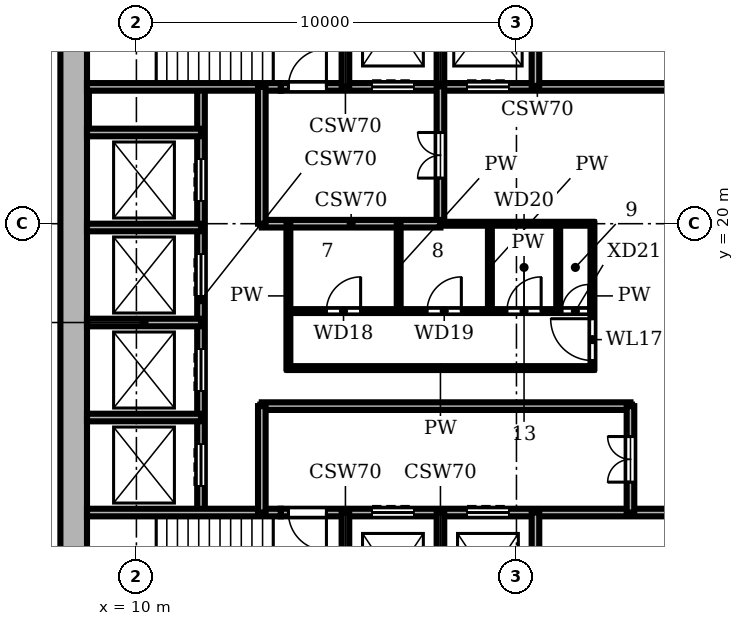
"""IFC4 building model, lengths in metres.
Left out: names, types, materials, properties, quantities, classifications, styles, units other than length and angle.
Written with IfcOpenShell. Run it as: python <this file> out.ifc"""

import sys

from ifc_helpers import new_model, si_unit, direction, frame, frame_2d, origin, place, context, subcontext, project, spatial, rectangle, extrude, element, fill, save


model = new_model("IFC4")
c1 = context("Model", 3, precision=1e-05, world=origin(), true_north=direction((0.0, 1.0)))
c2 = subcontext(c1, "Body", "Model", "MODEL_VIEW")
j1 = project(units=[si_unit("LENGTHUNIT", "METRE"), si_unit("PLANEANGLEUNIT", "RADIAN")], contexts=[c1])
p1 = place(None, origin())
s1 = spatial("IfcSite", under=j1, at=p1, CompositionType="ELEMENT")
p2 = place(p1, origin())
s2 = spatial("IfcBuilding", under=s1, at=p2, CompositionType="ELEMENT")
p3 = place(p2, frame((0.0, 0.0, 201.9)))
s3 = spatial("IfcBuildingStorey", under=s2, at=p3, CompositionType="ELEMENT", Elevation=201.9)
p4 = place(p3, frame((8.35, 27.3, 0.0), z_axis=(0.0, 0.0, 1.0), x_axis=(0.0, -1.0, 0.0)))
e1 = element("IfcWall", 1, at=p4, inside=s3, PredefinedType="SHEAR", context=c2, shape_type="SweptSolid", body=[
    extrude(rectangle(XDim=18.6, YDim=0.7, at=frame_2d((9.3, 0.0))), origin(), (0.0, 0.0, 1.0), 3.9),
])
p5 = place(p3, frame((8.7, 12.4, 0.0), z_axis=(0.0, 0.0, 1.0), x_axis=(1.0, 0.0, 0.0)))
e2 = element("IfcWall", 2, at=p5, inside=s3, PredefinedType="SHEAR", context=c2, shape_type="SweptSolid", body=[
    extrude(rectangle(XDim=5.1, YDim=0.2, at=frame_2d((2.55, 0.0))), origin(), (0.0, 0.0, 1.0), 3.58),
])
p6 = place(p3, frame((13.8, 12.4, 0.0), z_axis=(0.0, 0.0, 1.0), x_axis=(1.0, 0.0, 0.0)))
e3 = element("IfcWall", 3, at=p6, inside=s3, PredefinedType="SHEAR", context=c2, shape_type="SweptSolid", body=[
    extrude(rectangle(XDim=13.5, YDim=0.2, at=frame_2d((6.75, 0.0))), origin(), (0.0, 0.0, 1.0), 3.58),
])
p7 = place(p6, frame((2.4, 0.0, 0.0)))
e4 = element("IfcOpeningElement", 4, at=p7, cuts=e3, PredefinedType="OPENING", context=c2, shape_type="SweptSolid", body=[
    extrude(rectangle(XDim=1.1, YDim=2.1, at=frame_2d((0.55, 1.05))), frame((0.0, 0.11, 0.0), z_axis=(0.0, -1.0, 0.0), x_axis=(1.0, 0.0, 0.0)), (0.0, 0.0, 1.0), 0.22),
])
p8 = place(p6, frame((4.9, 0.0, 0.0)))
e5 = element("IfcOpeningElement", 5, at=p8, cuts=e3, PredefinedType="OPENING", context=c2, shape_type="SweptSolid", body=[
    extrude(rectangle(XDim=1.1, YDim=2.1, at=frame_2d((0.55, 1.05))), frame((0.0, 0.11, 0.0), z_axis=(0.0, -1.0, 0.0), x_axis=(1.0, 0.0, 0.0)), (0.0, 0.0, 1.0), 0.22),
])
p9 = place(p6, frame((0.2, 0.0, 0.0)))
e6 = element("IfcOpeningElement", 6, at=p9, cuts=e3, PredefinedType="OPENING", context=c2, shape_type="SweptSolid", body=[
    extrude(rectangle(XDim=1.0, YDim=2.1, at=frame_2d((0.5, 1.05))), frame((0.0, 0.11, 0.0), z_axis=(0.0, -1.0, 0.0), x_axis=(1.0, 0.0, 0.0)), (0.0, 0.0, 1.0), 0.22),
])
p10 = place(p3, frame((8.7, 14.9, 0.0), z_axis=(0.0, 0.0, 1.0), x_axis=(1.0, 0.0, 0.0)))
e7 = element("IfcWall", 7, at=p10, inside=s3, PredefinedType="SHEAR", context=c2, shape_type="SweptSolid", body=[
    extrude(rectangle(XDim=3.0, YDim=0.2, at=frame_2d((1.5, 0.0))), origin(), (0.0, 0.0, 1.0), 3.58),
])
p11 = place(p3, frame((13.3, 15.2, 0.0), z_axis=(0.0, 0.0, 1.0), x_axis=(1.0, 0.0, 0.0)))
e8 = element("IfcWall", 8, at=p11, inside=s3, PredefinedType="SHEAR", context=c2, shape_type="SweptSolid", body=[
    extrude(rectangle(XDim=9.7, YDim=0.2, at=frame_2d((4.85, 0.0))), origin(), (0.0, 0.0, 1.0), 3.58),
])
p12 = place(p3, frame((14.0, 16.2, 0.0), z_axis=(0.0, 0.0, 1.0), x_axis=(1.0, 0.0, 0.0)))
e9 = element("IfcWall", 9, at=p12, inside=s3, PredefinedType="PARTITIONING", context=c2, shape_type="SweptSolid", body=[
    extrude(rectangle(XDim=8.0, YDim=0.1, at=frame_2d((4.0, 0.0))), origin(), (0.0, 0.0, 1.0), 3.58),
])
p13 = place(p3, frame((8.7, 17.4, 0.0), z_axis=(0.0, 0.0, 1.0), x_axis=(1.0, 0.0, 0.0)))
e10 = element("IfcWall", 10, at=p13, inside=s3, PredefinedType="SHEAR", context=c2, shape_type="SweptSolid", body=[
    extrude(rectangle(XDim=3.0, YDim=0.2, at=frame_2d((1.5, 0.0))), origin(), (0.0, 0.0, 1.0), 3.58),
])
p14 = place(p3, frame((14.0, 17.7, 0.0), z_axis=(0.0, 0.0, 1.0), x_axis=(1.0, 0.0, 0.0)))
e11 = element("IfcWall", 11, at=p14, inside=s3, PredefinedType="PARTITIONING", context=c2, shape_type="SweptSolid", body=[
    extrude(rectangle(XDim=8.0, YDim=0.1, at=frame_2d((4.0, 0.0))), origin(), (0.0, 0.0, 1.0), 3.58),
])
p15 = place(p14, frame((1.0, 0.0, 0.0)))
e12 = element("IfcOpeningElement", 12, at=p15, cuts=e11, PredefinedType="OPENING", context=c2, shape_type="SweptSolid", body=[
    extrude(rectangle(XDim=0.9, YDim=2.1, at=frame_2d((0.45, 1.05))), frame((0.0, 0.06, 0.0), z_axis=(0.0, -1.0, 0.0), x_axis=(1.0, 0.0, 0.0)), (0.0, 0.0, 1.0), 0.12),
])
p16 = place(p14, frame((3.65, 0.0, 0.0)))
e13 = element("IfcOpeningElement", 13, at=p16, cuts=e11, PredefinedType="OPENING", context=c2, shape_type="SweptSolid", body=[
    extrude(rectangle(XDim=0.9, YDim=2.1, at=frame_2d((0.45, 1.05))), frame((0.0, 0.06, 0.0), z_axis=(0.0, -1.0, 0.0), x_axis=(1.0, 0.0, 0.0)), (0.0, 0.0, 1.0), 0.12),
])
p17 = place(p14, frame((5.75, 0.0, 0.0)))
e14 = element("IfcOpeningElement", 14, at=p17, cuts=e11, PredefinedType="OPENING", context=c2, shape_type="SweptSolid", body=[
    extrude(rectangle(XDim=0.9, YDim=2.1, at=frame_2d((0.45, 1.05))), frame((0.0, 0.06, 0.0), z_axis=(0.0, -1.0, 0.0), x_axis=(1.0, 0.0, 0.0)), (0.0, 0.0, 1.0), 0.12),
])
p18 = place(p14, frame((7.2, 0.0, 0.0)))
e15 = element("IfcOpeningElement", 15, at=p18, cuts=e11, PredefinedType="OPENING", context=c2, shape_type="SweptSolid", body=[
    extrude(rectangle(XDim=0.7, YDim=2.1, at=frame_2d((0.35, 1.05))), frame((0.0, 0.06, 0.0), z_axis=(0.0, -1.0, 0.0), x_axis=(1.0, 0.0, 0.0)), (0.0, 0.0, 1.0), 0.12),
])
p19 = place(p3, frame((8.7, 19.9, 0.0), z_axis=(0.0, 0.0, 1.0), x_axis=(1.0, 0.0, 0.0)))
e16 = element("IfcWall", 16, at=p19, inside=s3, PredefinedType="SHEAR", context=c2, shape_type="SweptSolid", body=[
    extrude(rectangle(XDim=3.0, YDim=0.2, at=frame_2d((1.5, 0.0))), origin(), (0.0, 0.0, 1.0), 3.58),
])
p20 = place(p3, frame((18.0, 20.0, 0.0), z_axis=(0.0, 0.0, 1.0), x_axis=(1.0, 0.0, 0.0)))
e17 = element("IfcWall", 17, at=p20, inside=s3, PredefinedType="PARTITIONING", context=c2, shape_type="SweptSolid", body=[
    extrude(rectangle(XDim=4.0, YDim=0.1, at=frame_2d((2.0, 0.0))), origin(), (0.0, 0.0, 1.0), 3.58),
])
p21 = place(p3, frame((13.3, 20.0, 0.0), z_axis=(0.0, 0.0, 1.0), x_axis=(1.0, 0.0, 0.0)))
e18 = element("IfcWall", 18, at=p21, inside=s3, PredefinedType="SHEAR", context=c2, shape_type="SweptSolid", body=[
    extrude(rectangle(XDim=4.7, YDim=0.2, at=frame_2d((2.35, 0.0))), origin(), (0.0, 0.0, 1.0), 3.58),
])
p22 = place(p3, frame((8.7, 22.4, 0.0), z_axis=(0.0, 0.0, 1.0), x_axis=(1.0, 0.0, 0.0)))
e19 = element("IfcWall", 19, at=p22, inside=s3, PredefinedType="SHEAR", context=c2, shape_type="SweptSolid", body=[
    extrude(rectangle(XDim=3.0, YDim=0.2, at=frame_2d((1.5, 0.0))), origin(), (0.0, 0.0, 1.0), 3.58),
])
p23 = place(p3, frame((8.7, 23.6, 0.0), z_axis=(0.0, 0.0, 1.0), x_axis=(1.0, 0.0, 0.0)))
e20 = element("IfcWall", 20, at=p23, inside=s3, PredefinedType="SHEAR", context=c2, shape_type="SweptSolid", body=[
    extrude(rectangle(XDim=5.1, YDim=0.2, at=frame_2d((2.55, 0.0))), origin(), (0.0, 0.0, 1.0), 3.58),
])
p24 = place(p3, frame((13.8, 23.6, 0.0), z_axis=(0.0, 0.0, 1.0), x_axis=(1.0, 0.0, 0.0)))
e21 = element("IfcWall", 21, at=p24, inside=s3, PredefinedType="SHEAR", context=c2, shape_type="SweptSolid", body=[
    extrude(rectangle(XDim=13.5, YDim=0.2, at=frame_2d((6.75, 0.0))), origin(), (0.0, 0.0, 1.0), 3.58),
])
p25 = place(p24, frame((2.4, 0.0, 0.0)))
e22 = element("IfcOpeningElement", 22, at=p25, cuts=e21, PredefinedType="OPENING", context=c2, shape_type="SweptSolid", body=[
    extrude(rectangle(XDim=1.1, YDim=2.1, at=frame_2d((0.55, 1.05))), frame((0.0, 0.11, 0.0), z_axis=(0.0, -1.0, 0.0), x_axis=(1.0, 0.0, 0.0)), (0.0, 0.0, 1.0), 0.22),
])
p26 = place(p24, frame((4.9, 0.0, 0.0)))
e23 = element("IfcOpeningElement", 23, at=p26, cuts=e21, PredefinedType="OPENING", context=c2, shape_type="SweptSolid", body=[
    extrude(rectangle(XDim=1.1, YDim=2.1, at=frame_2d((0.55, 1.05))), frame((0.0, 0.11, 0.0), z_axis=(0.0, -1.0, 0.0), x_axis=(1.0, 0.0, 0.0)), (0.0, 0.0, 1.0), 0.22),
])
p27 = place(p24, frame((0.2, 0.0, 0.0)))
e24 = element("IfcOpeningElement", 24, at=p27, cuts=e21, PredefinedType="OPENING", context=c2, shape_type="SweptSolid", body=[
    extrude(rectangle(XDim=1.0, YDim=2.1, at=frame_2d((0.5, 1.05))), frame((0.0, 0.11, 0.0), z_axis=(0.0, -1.0, 0.0), x_axis=(1.0, 0.0, 0.0)), (0.0, 0.0, 1.0), 0.22),
])
p28 = place(p3, frame((11.7, 12.4, 0.0), z_axis=(0.0, 0.0, 1.0), x_axis=(0.0, 1.0, 0.0)))
e25 = element("IfcWall", 25, at=p28, inside=s3, PredefinedType="SHEAR", context=c2, shape_type="SweptSolid", body=[
    extrude(rectangle(XDim=11.2, YDim=0.2, at=frame_2d((5.6, 0.0))), origin(), (0.0, 0.0, 1.0), 3.58),
])
p29 = place(p28, frame((0.7, 0.0, 0.0)))
e26 = element("IfcOpeningElement", 26, at=p29, cuts=e25, PredefinedType="OPENING", context=c2, shape_type="SweptSolid", body=[
    extrude(rectangle(XDim=1.1, YDim=2.1, at=frame_2d((0.55, 1.05))), frame((0.0, 0.11, 0.0), z_axis=(0.0, -1.0, 0.0), x_axis=(1.0, 0.0, 0.0)), (0.0, 0.0, 1.0), 0.22),
])
p30 = place(p28, frame((3.2, 0.0, 0.0)))
e27 = element("IfcOpeningElement", 27, at=p30, cuts=e25, PredefinedType="OPENING", context=c2, shape_type="SweptSolid", body=[
    extrude(rectangle(XDim=1.1, YDim=2.1, at=frame_2d((0.55, 1.05))), frame((0.0, 0.11, 0.0), z_axis=(0.0, -1.0, 0.0), x_axis=(1.0, 0.0, 0.0)), (0.0, 0.0, 1.0), 0.22),
])
p31 = place(p28, frame((5.7, 0.0, 0.0)))
e28 = element("IfcOpeningElement", 28, at=p31, cuts=e25, PredefinedType="OPENING", context=c2, shape_type="SweptSolid", body=[
    extrude(rectangle(XDim=1.1, YDim=2.1, at=frame_2d((0.55, 1.05))), frame((0.0, 0.11, 0.0), z_axis=(0.0, -1.0, 0.0), x_axis=(1.0, 0.0, 0.0)), (0.0, 0.0, 1.0), 0.22),
])
p32 = place(p28, frame((8.2, 0.0, 0.0)))
e29 = element("IfcOpeningElement", 29, at=p32, cuts=e25, PredefinedType="OPENING", context=c2, shape_type="SweptSolid", body=[
    extrude(rectangle(XDim=1.1, YDim=2.1, at=frame_2d((0.55, 1.05))), frame((0.0, 0.11, 0.0), z_axis=(0.0, -1.0, 0.0), x_axis=(1.0, 0.0, 0.0)), (0.0, 0.0, 1.0), 0.22),
])
p33 = place(p3, frame((13.3, 12.4, 0.0), z_axis=(0.0, 0.0, 1.0), x_axis=(0.0, 1.0, 0.0)))
e30 = element("IfcWall", 30, at=p33, inside=s3, PredefinedType="SHEAR", context=c2, shape_type="SweptSolid", body=[
    extrude(rectangle(XDim=2.8, YDim=0.2, at=frame_2d((1.4, 0.0))), origin(), (0.0, 0.0, 1.0), 3.58),
])
p34 = place(p3, frame((13.3, 20.0, 0.0), z_axis=(0.0, 0.0, 1.0), x_axis=(0.0, 1.0, 0.0)))
e31 = element("IfcWall", 31, at=p34, inside=s3, PredefinedType="SHEAR", context=c2, shape_type="SweptSolid", body=[
    extrude(rectangle(XDim=3.6, YDim=0.2, at=frame_2d((1.8, 0.0))), origin(), (0.0, 0.0, 1.0), 3.58),
])
p35 = place(p3, frame((14.0, 16.2, 0.0), z_axis=(0.0, 0.0, 1.0), x_axis=(0.0, 1.0, 0.0)))
e32 = element("IfcWall", 32, at=p35, inside=s3, PredefinedType="PARTITIONING", context=c2, shape_type="SweptSolid", body=[
    extrude(rectangle(XDim=3.8, YDim=0.1, at=frame_2d((1.9, 0.0))), origin(), (0.0, 0.0, 1.0), 3.58),
])
for number, where, z_axis, x_axis in (
    (33, (15.5, 8.7, 0.0), (0.0, 0.0, 1.0), (0.0, 1.0, 0.0)),
    (34, (15.5, 23.6, 0.0), (0.0, 0.0, 1.0), (0.0, 1.0, 0.0)),
):
    element("IfcWall", number, at=place(p3, frame(where, z_axis=z_axis, x_axis=x_axis)), inside=s3, PredefinedType="SHEAR", context=c2, shape_type="SweptSolid", body=[
        extrude(rectangle(XDim=3.7, YDim=0.2, at=frame_2d((1.85, 0.0))), origin(), (0.0, 0.0, 1.0), 3.58),
    ])
p36 = place(p3, frame((16.9, 17.7, 0.0), z_axis=(0.0, 0.0, 1.0), x_axis=(0.0, 1.0, 0.0)))
e35 = element("IfcWall", 35, at=p36, inside=s3, PredefinedType="PARTITIONING", context=c2, shape_type="SweptSolid", body=[
    extrude(rectangle(XDim=2.3, YDim=0.1, at=frame_2d((1.15, 0.0))), origin(), (0.0, 0.0, 1.0), 3.58),
])
p37 = place(p3, frame((18.0, 8.7, 0.0), z_axis=(0.0, 0.0, 1.0), x_axis=(0.0, 1.0, 0.0)))
e36 = element("IfcWall", 36, at=p37, inside=s3, PredefinedType="SHEAR", context=c2, shape_type="SweptSolid", body=[
    extrude(rectangle(XDim=3.7, YDim=0.2, at=frame_2d((1.85, 0.0))), origin(), (0.0, 0.0, 1.0), 3.58),
])
p38 = place(p3, frame((18.0, 20.0, 0.0), z_axis=(0.0, 0.0, 1.0), x_axis=(0.0, 1.0, 0.0)))
e37 = element("IfcWall", 37, at=p38, inside=s3, PredefinedType="SHEAR", context=c2, shape_type="SweptSolid", body=[
    extrude(rectangle(XDim=7.3, YDim=0.2, at=frame_2d((3.65, 0.0))), origin(), (0.0, 0.0, 1.0), 3.58),
])
p39 = place(p38, frame((1.2, 0.0, 0.0)))
e38 = element("IfcOpeningElement", 38, at=p39, cuts=e37, PredefinedType="OPENING", context=c2, shape_type="SweptSolid", body=[
    extrude(rectangle(XDim=1.2, YDim=2.1, at=frame_2d((0.6, 1.05))), frame((0.0, 0.11, 0.0), z_axis=(0.0, -1.0, 0.0), x_axis=(1.0, 0.0, 0.0)), (0.0, 0.0, 1.0), 0.22),
])
p40 = place(p3, frame((19.3, 17.7, 0.0), z_axis=(0.0, 0.0, 1.0), x_axis=(0.0, 1.0, 0.0)))
e39 = element("IfcWall", 39, at=p40, inside=s3, PredefinedType="PARTITIONING", context=c2, shape_type="SweptSolid", body=[
    extrude(rectangle(XDim=2.3, YDim=0.1, at=frame_2d((1.15, 0.0))), origin(), (0.0, 0.0, 1.0), 3.58),
])
for number, where, z_axis, x_axis in (
    (40, (20.5, 8.7, 0.0), (0.0, 0.0, 1.0), (0.0, 1.0, 0.0)),
    (41, (20.5, 23.6, 0.0), (0.0, 0.0, 1.0), (0.0, 1.0, 0.0)),
):
    element("IfcWall", number, at=place(p3, frame(where, z_axis=z_axis, x_axis=x_axis)), inside=s3, PredefinedType="SHEAR", context=c2, shape_type="SweptSolid", body=[
        extrude(rectangle(XDim=3.7, YDim=0.2, at=frame_2d((1.85, 0.0))), origin(), (0.0, 0.0, 1.0), 3.58),
    ])
p41 = place(p3, frame((21.1, 17.7, 0.0), z_axis=(0.0, 0.0, 1.0), x_axis=(0.0, 1.0, 0.0)))
e42 = element("IfcWall", 42, at=p41, inside=s3, PredefinedType="PARTITIONING", context=c2, shape_type="SweptSolid", body=[
    extrude(rectangle(XDim=2.3, YDim=0.1, at=frame_2d((1.15, 0.0))), origin(), (0.0, 0.0, 1.0), 3.58),
])
p42 = place(p3, frame((22.0, 16.2, 0.0), z_axis=(0.0, 0.0, 1.0), x_axis=(0.0, 1.0, 0.0)))
e43 = element("IfcWall", 43, at=p42, inside=s3, PredefinedType="PARTITIONING", context=c2, shape_type="SweptSolid", body=[
    extrude(rectangle(XDim=3.8, YDim=0.1, at=frame_2d((1.9, 0.0))), origin(), (0.0, 0.0, 1.0), 3.58),
])
p43 = place(p42, frame((0.2, 0.0, 0.0)))
e44 = element("IfcOpeningElement", 44, at=p43, cuts=e43, PredefinedType="OPENING", context=c2, shape_type="SweptSolid", body=[
    extrude(rectangle(XDim=1.1, YDim=2.1, at=frame_2d((0.55, 1.05))), frame((0.0, 0.06, 0.0), z_axis=(0.0, -1.0, 0.0), x_axis=(1.0, 0.0, 0.0)), (0.0, 0.0, 1.0), 0.12),
])
p44 = place(p3, frame((23.0, 12.4, 0.0), z_axis=(0.0, 0.0, 1.0), x_axis=(0.0, 1.0, 0.0)))
e45 = element("IfcWall", 45, at=p44, inside=s3, PredefinedType="SHEAR", context=c2, shape_type="SweptSolid", body=[
    extrude(rectangle(XDim=2.8, YDim=0.2, at=frame_2d((1.4, 0.0))), origin(), (0.0, 0.0, 1.0), 3.58),
])
p45 = place(p44, frame((0.8, 0.0, 0.0)))
e46 = element("IfcOpeningElement", 46, at=p45, cuts=e45, PredefinedType="OPENING", context=c2, shape_type="SweptSolid", body=[
    extrude(rectangle(XDim=1.2, YDim=2.1, at=frame_2d((0.6, 1.05))), frame((0.0, 0.11, 0.0), z_axis=(0.0, -1.0, 0.0), x_axis=(1.0, 0.0, 0.0)), (0.0, 0.0, 1.0), 0.22),
])
p46 = place(p29, origin())
e47 = element("IfcDoor", 47, at=p46, inside=s3, OperationType="DOUBLE_DOOR_SLIDING", PredefinedType="DOOR", context=c2, shape_type="SweptSolid", body=[
    extrude(rectangle(XDim=1.1, YDim=2.1, at=frame_2d((0.55, 1.05))), frame((0.0, 0.025, 0.0), z_axis=(0.0, -1.0, 0.0), x_axis=(1.0, 0.0, 0.0)), (0.0, 0.0, 1.0), 0.05),
])
fill(e26, e47)
p47 = place(p30, origin())
e48 = element("IfcDoor", 48, at=p47, inside=s3, OperationType="DOUBLE_DOOR_SLIDING", PredefinedType="DOOR", context=c2, shape_type="SweptSolid", body=[
    extrude(rectangle(XDim=1.1, YDim=2.1, at=frame_2d((0.55, 1.05))), frame((0.0, 0.025, 0.0), z_axis=(0.0, -1.0, 0.0), x_axis=(1.0, 0.0, 0.0)), (0.0, 0.0, 1.0), 0.05),
])
fill(e27, e48)
p48 = place(p31, origin())
e49 = element("IfcDoor", 49, at=p48, inside=s3, OperationType="DOUBLE_DOOR_SLIDING", PredefinedType="DOOR", context=c2, shape_type="SweptSolid", body=[
    extrude(rectangle(XDim=1.1, YDim=2.1, at=frame_2d((0.55, 1.05))), frame((0.0, 0.025, 0.0), z_axis=(0.0, -1.0, 0.0), x_axis=(1.0, 0.0, 0.0)), (0.0, 0.0, 1.0), 0.05),
])
fill(e28, e49)
p49 = place(p32, origin())
e50 = element("IfcDoor", 50, at=p49, inside=s3, OperationType="DOUBLE_DOOR_SLIDING", PredefinedType="DOOR", context=c2, shape_type="SweptSolid", body=[
    extrude(rectangle(XDim=1.1, YDim=2.1, at=frame_2d((0.55, 1.05))), frame((0.0, 0.025, 0.0), z_axis=(0.0, -1.0, 0.0), x_axis=(1.0, 0.0, 0.0)), (0.0, 0.0, 1.0), 0.05),
])
fill(e29, e50)
p50 = place(p7, origin())
e51 = element("IfcDoor", 51, at=p50, inside=s3, OperationType="DOUBLE_DOOR_SLIDING", PredefinedType="DOOR", context=c2, shape_type="SweptSolid", body=[
    extrude(rectangle(XDim=1.1, YDim=2.1, at=frame_2d((0.55, 1.05))), frame((0.0, 0.025, 0.0), z_axis=(0.0, -1.0, 0.0), x_axis=(1.0, 0.0, 0.0)), (0.0, 0.0, 1.0), 0.05),
])
fill(e4, e51)
p51 = place(p8, origin())
e52 = element("IfcDoor", 52, at=p51, inside=s3, OperationType="DOUBLE_DOOR_SLIDING", PredefinedType="DOOR", context=c2, shape_type="SweptSolid", body=[
    extrude(rectangle(XDim=1.1, YDim=2.1, at=frame_2d((0.55, 1.05))), frame((0.0, 0.025, 0.0), z_axis=(0.0, -1.0, 0.0), x_axis=(1.0, 0.0, 0.0)), (0.0, 0.0, 1.0), 0.05),
])
fill(e5, e52)
p52 = place(p25, origin())
e53 = element("IfcDoor", 53, at=p52, inside=s3, OperationType="DOUBLE_DOOR_SLIDING", PredefinedType="DOOR", context=c2, shape_type="SweptSolid", body=[
    extrude(rectangle(XDim=1.1, YDim=2.1, at=frame_2d((0.55, 1.05))), frame((0.0, 0.025, 0.0), z_axis=(0.0, -1.0, 0.0), x_axis=(1.0, 0.0, 0.0)), (0.0, 0.0, 1.0), 0.05),
])
fill(e22, e53)
p53 = place(p26, origin())
e54 = element("IfcDoor", 54, at=p53, inside=s3, OperationType="DOUBLE_DOOR_SLIDING", PredefinedType="DOOR", context=c2, shape_type="SweptSolid", body=[
    extrude(rectangle(XDim=1.1, YDim=2.1, at=frame_2d((0.55, 1.05))), frame((0.0, 0.025, 0.0), z_axis=(0.0, -1.0, 0.0), x_axis=(1.0, 0.0, 0.0)), (0.0, 0.0, 1.0), 0.05),
])
fill(e23, e54)
p54 = place(p9, frame((1.0, 0.0, 0.0), z_axis=(0.0, 0.0, 1.0), x_axis=(-1.0, 0.0, 0.0)))
e55 = element("IfcDoor", 55, at=p54, inside=s3, OperationType="SINGLE_SWING_LEFT", PredefinedType="DOOR", context=c2, shape_type="SweptSolid", body=[
    extrude(rectangle(XDim=1.0, YDim=2.1, at=frame_2d((0.5, 1.05))), frame((0.0, 0.025, 0.0), z_axis=(0.0, -1.0, 0.0), x_axis=(1.0, 0.0, 0.0)), (0.0, 0.0, 1.0), 0.05),
])
fill(e6, e55)
p55 = place(p27, origin())
e56 = element("IfcDoor", 56, at=p55, inside=s3, OperationType="SINGLE_SWING_RIGHT", PredefinedType="DOOR", context=c2, shape_type="SweptSolid", body=[
    extrude(rectangle(XDim=1.0, YDim=2.1, at=frame_2d((0.5, 1.05))), frame((0.0, 0.025, 0.0), z_axis=(0.0, -1.0, 0.0), x_axis=(1.0, 0.0, 0.0)), (0.0, 0.0, 1.0), 0.05),
])
fill(e24, e56)
p56 = place(p45, origin())
e57 = element("IfcDoor", 57, at=p56, inside=s3, OperationType="DOUBLE_DOOR_SINGLE_SWING", PredefinedType="DOOR", context=c2, shape_type="SweptSolid", body=[
    extrude(rectangle(XDim=1.2, YDim=2.1, at=frame_2d((0.6, 1.05))), frame((0.0, 0.025, 0.0), z_axis=(0.0, -1.0, 0.0), x_axis=(1.0, 0.0, 0.0)), (0.0, 0.0, 1.0), 0.05),
])
fill(e46, e57)
p57 = place(p39, origin())
e58 = element("IfcDoor", 58, at=p57, inside=s3, OperationType="DOUBLE_DOOR_SINGLE_SWING", PredefinedType="DOOR", context=c2, shape_type="SweptSolid", body=[
    extrude(rectangle(XDim=1.2, YDim=2.1, at=frame_2d((0.6, 1.05))), frame((0.0, 0.025, 0.0), z_axis=(0.0, -1.0, 0.0), x_axis=(1.0, 0.0, 0.0)), (0.0, 0.0, 1.0), 0.05),
])
fill(e38, e58)
p58 = place(p43, origin())
e59 = element("IfcDoor", 59, at=p58, inside=s3, OperationType="SINGLE_SWING_RIGHT", PredefinedType="DOOR", context=c2, shape_type="SweptSolid", body=[
    extrude(rectangle(XDim=1.1, YDim=2.1, at=frame_2d((0.55, 1.05))), frame((0.0, 0.025, 0.0), z_axis=(0.0, -1.0, 0.0), x_axis=(1.0, 0.0, 0.0)), (0.0, 0.0, 1.0), 0.05),
])
fill(e44, e59)
p59 = place(p15, origin())
e60 = element("IfcDoor", 60, at=p59, inside=s3, OperationType="SINGLE_SWING_RIGHT", PredefinedType="DOOR", context=c2, shape_type="SweptSolid", body=[
    extrude(rectangle(XDim=0.9, YDim=2.1, at=frame_2d((0.45, 1.05))), frame((0.0, 0.025, 0.0), z_axis=(0.0, -1.0, 0.0), x_axis=(1.0, 0.0, 0.0)), (0.0, 0.0, 1.0), 0.05),
])
fill(e12, e60)
p60 = place(p16, origin())
e61 = element("IfcDoor", 61, at=p60, inside=s3, OperationType="SINGLE_SWING_RIGHT", PredefinedType="DOOR", context=c2, shape_type="SweptSolid", body=[
    extrude(rectangle(XDim=0.9, YDim=2.1, at=frame_2d((0.45, 1.05))), frame((0.0, 0.025, 0.0), z_axis=(0.0, -1.0, 0.0), x_axis=(1.0, 0.0, 0.0)), (0.0, 0.0, 1.0), 0.05),
])
fill(e13, e61)
p61 = place(p17, origin())
e62 = element("IfcDoor", 62, at=p61, inside=s3, OperationType="SINGLE_SWING_RIGHT", PredefinedType="DOOR", context=c2, shape_type="SweptSolid", body=[
    extrude(rectangle(XDim=0.9, YDim=2.1, at=frame_2d((0.45, 1.05))), frame((0.0, 0.025, 0.0), z_axis=(0.0, -1.0, 0.0), x_axis=(1.0, 0.0, 0.0)), (0.0, 0.0, 1.0), 0.05),
])
fill(e14, e62)
p62 = place(p18, origin())
e63 = element("IfcDoor", 63, at=p62, inside=s3, OperationType="SINGLE_SWING_RIGHT", PredefinedType="DOOR", context=c2, shape_type="SweptSolid", body=[
    extrude(rectangle(XDim=0.7, YDim=2.1, at=frame_2d((0.35, 1.05))), frame((0.0, 0.025, 0.0), z_axis=(0.0, -1.0, 0.0), x_axis=(1.0, 0.0, 0.0)), (0.0, 0.0, 1.0), 0.05),
])
fill(e15, e63)
save(model, sys.argv[1])
